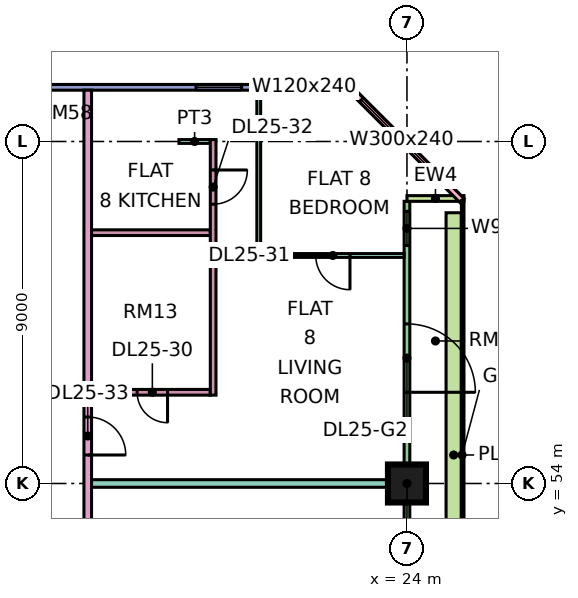
"""IFC4 building model, lengths in metres.
Left out: names, types, materials, properties, quantities, classifications, styles, units other than length and angle.
Written with IfcOpenShell. Run it as: python <this file> out.ifc"""

import sys

from ifc_helpers import new_model, si_unit, direction, frame, frame_2d, origin, origin_2d, place, context, subcontext, project, spatial, rectangle, extrude, element, fill, save


model = new_model("IFC4")
c1 = context("Model", 3, precision=1e-05, world=origin(), true_north=direction((0.0, 1.0)))
c2 = subcontext(c1, "Body", "Model", "MODEL_VIEW")
j1 = project(units=[si_unit("LENGTHUNIT", "METRE"), si_unit("PLANEANGLEUNIT", "RADIAN")], contexts=[c1])
p1 = place(None, origin())
s1 = spatial("IfcSite", under=j1, at=p1, CompositionType="ELEMENT")
p2 = place(p1, origin())
s2 = spatial("IfcBuilding", under=s1, at=p2, CompositionType="ELEMENT")
p3 = place(p2, frame((0.0, 0.0, 110.65)))
s3 = spatial("IfcBuildingStorey", under=s2, at=p3, CompositionType="ELEMENT", Elevation=110.65)
p4 = place(p3, frame((24.0, 54.0, 0.0), z_axis=(0.0, 0.0, 1.0), x_axis=(1.0, 0.0, 0.0)))
e1 = element("IfcColumn", 1, at=p4, inside=s3, PredefinedType="COLUMN", context=c2, shape_type="SweptSolid", body=[
    extrude(rectangle(XDim=1.0, YDim=1.0, at=origin_2d()), origin(), (0.0, 0.0, 1.0), 3.75),
])
p5 = place(p3, frame((24.0, 48.075, 0.0), z_axis=(0.0, 0.0, 1.0), x_axis=(0.0, 1.0, 0.0)))
e2 = element("IfcWall", 2, at=p5, inside=s3, PredefinedType="SOLIDWALL", context=c2, shape_type="SweptSolid", body=[
    extrude(rectangle(XDim=13.35, YDim=0.15, at=frame_2d((6.675, 0.0))), origin(), (0.0, 0.0, 1.0), 3.35),
])
p6 = place(p5, frame((0.562, 0.0, 0.45)))
e3 = element("IfcOpeningElement", 3, at=p6, cuts=e2, PredefinedType="OPENING", context=c2, shape_type="SweptSolid", body=[
    extrude(rectangle(XDim=4.2, YDim=2.4, at=frame_2d((2.1, 1.2))), frame((0.0, 0.085, 0.0), z_axis=(0.0, -1.0, 0.0), x_axis=(1.0, 0.0, 0.0)), (0.0, 0.0, 1.0), 0.17),
])
p7 = place(p5, frame((8.325, 0.0, 0.0)))
e4 = element("IfcOpeningElement", 4, at=p7, cuts=e2, PredefinedType="OPENING", context=c2, shape_type="SweptSolid", body=[
    extrude(rectangle(XDim=1.8, YDim=2.4, at=frame_2d((0.9, 1.2))), frame((0.0, 0.085, 0.0), z_axis=(0.0, -1.0, 0.0), x_axis=(1.0, 0.0, 0.0)), (0.0, 0.0, 1.0), 0.17),
])
p8 = place(p5, frame((12.188, 0.0, 0.45)))
e5 = element("IfcOpeningElement", 5, at=p8, cuts=e2, PredefinedType="OPENING", context=c2, shape_type="SweptSolid", body=[
    extrude(rectangle(XDim=0.9, YDim=2.4, at=frame_2d((0.45, 1.2))), frame((0.0, 0.085, 0.0), z_axis=(0.0, -1.0, 0.0), x_axis=(1.0, 0.0, 0.0)), (0.0, 0.0, 1.0), 0.17),
])
p9 = place(p3, frame((25.5, 61.5, 0.0), z_axis=(0.0, 0.0, 1.0), x_axis=(-1.0, 0.0, 0.0)))
e6 = element("IfcWall", 6, at=p9, inside=s3, PredefinedType="SOLIDWALL", context=c2, shape_type="SweptSolid", body=[
    extrude(rectangle(XDim=1.5, YDim=0.15, at=frame_2d((0.75, 0.0))), origin(), (0.0, 0.0, 1.0), 3.35),
])
p10 = place(p3, frame((25.447, 61.447, 0.0), z_axis=(0.0, 0.0, 1.0), x_axis=(-0.707106781187, 0.707106781187, 0.0)))
e7 = element("IfcWall", 7, at=p10, inside=s3, PredefinedType="SOLIDWALL", context=c2, shape_type="SweptSolid", body=[
    extrude(rectangle(XDim=4.243, YDim=0.15, at=frame_2d((2.121, 0.0))), origin(), (0.0, 0.0, 1.0), 3.35),
])
p11 = place(p10, frame((0.744, 0.0, 0.45)))
e8 = element("IfcOpeningElement", 8, at=p11, cuts=e7, PredefinedType="OPENING", context=c2, shape_type="SweptSolid", body=[
    extrude(rectangle(XDim=3.0, YDim=2.4, at=frame_2d((1.5, 1.2))), frame((0.0, 0.085, 0.0), z_axis=(0.0, -1.0, 0.0), x_axis=(1.0, 0.0, 0.0)), (0.0, 0.0, 1.0), 0.17),
])
p12 = place(p3, frame((22.5, 64.425, 0.0), z_axis=(0.0, 0.0, 1.0), x_axis=(-1.0, 0.0, 0.0)))
e9 = element("IfcWall", 9, at=p12, inside=s3, PredefinedType="SOLIDWALL", context=c2, shape_type="SweptSolid", body=[
    extrude(rectangle(XDim=10.425, YDim=0.15, at=frame_2d((5.212, 0.0))), origin(), (0.0, 0.0, 1.0), 3.35),
])
p13 = place(p12, frame((0.6, 0.0, 0.45)))
e10 = element("IfcOpeningElement", 10, at=p13, cuts=e9, PredefinedType="OPENING", context=c2, shape_type="SweptSolid", body=[
    extrude(rectangle(XDim=1.2, YDim=2.4, at=frame_2d((0.6, 1.2))), frame((0.0, 0.085, 0.0), z_axis=(0.0, -1.0, 0.0), x_axis=(1.0, 0.0, 0.0)), (0.0, 0.0, 1.0), 0.17),
])
p14 = place(p12, frame((2.85, 0.0, 0.45)))
e11 = element("IfcOpeningElement", 11, at=p14, cuts=e9, PredefinedType="OPENING", context=c2, shape_type="SweptSolid", body=[
    extrude(rectangle(XDim=1.2, YDim=2.4, at=frame_2d((0.6, 1.2))), frame((0.0, 0.085, 0.0), z_axis=(0.0, -1.0, 0.0), x_axis=(1.0, 0.0, 0.0)), (0.0, 0.0, 1.0), 0.17),
])
p15 = place(p3, frame((25.229, 48.375, 0.0), z_axis=(0.0, 0.0, 1.0), x_axis=(0.0, 1.0, 0.0)))
e12 = element("IfcWall", 12, at=p15, inside=s3, PredefinedType="SOLIDWALL", context=c2, shape_type="SweptSolid", body=[
    extrude(rectangle(XDim=12.75, YDim=0.4, at=frame_2d((6.375, 0.0))), origin(), (0.0, 0.0, 1.0), 0.7),
])
p16 = place(p3, frame((15.6, 51.225, 0.0), z_axis=(0.0, 0.0, 1.0), x_axis=(0.0, 1.0, 0.0)))
e13 = element("IfcWall", 13, at=p16, inside=s3, PredefinedType="PARTITIONING", context=c2, shape_type="SweptSolid", body=[
    extrude(rectangle(XDim=13.125, YDim=0.2, at=frame_2d((6.562, 0.0))), origin(), (0.0, 0.0, 1.0), 3.35),
])
p17 = place(p16, frame((3.525, 0.0, 0.0)))
e14 = element("IfcOpeningElement", 14, at=p17, cuts=e13, PredefinedType="OPENING", context=c2, shape_type="SweptSolid", body=[
    extrude(rectangle(XDim=1.0, YDim=2.1, at=frame_2d((0.5, 1.05))), frame((0.0, 0.11, 0.0), z_axis=(0.0, -1.0, 0.0), x_axis=(1.0, 0.0, 0.0)), (0.0, 0.0, 1.0), 0.22),
])
p18 = place(p3, frame((15.7, 54.0, 0.0), z_axis=(0.0, 0.0, 1.0), x_axis=(1.0, 0.0, 0.0)))
e15 = element("IfcWall", 15, at=p18, inside=s3, PredefinedType="PARTITIONING", context=c2, shape_type="SweptSolid", body=[
    extrude(rectangle(XDim=8.226, YDim=0.2, at=frame_2d((4.113, 0.0))), origin(), (0.0, 0.0, 1.0), 3.35),
])
p19 = place(p3, frame((15.7, 56.4, 0.0), z_axis=(0.0, 0.0, 1.0), x_axis=(1.0, 0.0, 0.0)))
e16 = element("IfcWall", 16, at=p19, inside=s3, PredefinedType="PARTITIONING", context=c2, shape_type="SweptSolid", body=[
    extrude(rectangle(XDim=3.125, YDim=0.15, at=frame_2d((1.562, 0.0))), origin(), (0.0, 0.0, 1.0), 3.35),
])
p20 = place(p19, frame((1.2, 0.0, 0.0)))
e17 = element("IfcOpeningElement", 17, at=p20, cuts=e16, PredefinedType="OPENING", context=c2, shape_type="SweptSolid", body=[
    extrude(rectangle(XDim=0.8, YDim=2.1, at=frame_2d((0.4, 1.05))), frame((0.0, 0.085, 0.0), z_axis=(0.0, -1.0, 0.0), x_axis=(1.0, 0.0, 0.0)), (0.0, 0.0, 1.0), 0.17),
])
p21 = place(p3, frame((15.7, 60.6, 0.0), z_axis=(0.0, 0.0, 1.0), x_axis=(1.0, 0.0, 0.0)))
e18 = element("IfcWall", 18, at=p21, inside=s3, PredefinedType="PARTITIONING", context=c2, shape_type="SweptSolid", body=[
    extrude(rectangle(XDim=3.125, YDim=0.15, at=frame_2d((1.562, 0.0))), origin(), (0.0, 0.0, 1.0), 3.35),
])
p22 = place(p3, frame((18.0, 63.0, 0.0), z_axis=(0.0, 0.0, 1.0), x_axis=(1.0, 0.0, 0.0)))
e19 = element("IfcWall", 19, at=p22, inside=s3, PredefinedType="PARTITIONING", context=c2, shape_type="SweptSolid", body=[
    extrude(rectangle(XDim=0.825, YDim=0.1, at=frame_2d((0.413, 0.0))), origin(), (0.0, 0.0, 1.0), 3.35),
])
p23 = place(p3, frame((18.9, 56.325, 0.0), z_axis=(0.0, 0.0, 1.0), x_axis=(0.0, 1.0, 0.0)))
e20 = element("IfcWall", 20, at=p23, inside=s3, PredefinedType="PARTITIONING", context=c2, shape_type="SweptSolid", body=[
    extrude(rectangle(XDim=6.725, YDim=0.15, at=frame_2d((3.363, 0.0))), origin(), (0.0, 0.0, 1.0), 3.35),
])
p24 = place(p23, frame((5.025, 0.0, 0.0)))
e21 = element("IfcOpeningElement", 21, at=p24, cuts=e20, PredefinedType="OPENING", context=c2, shape_type="SweptSolid", body=[
    extrude(rectangle(XDim=0.9, YDim=2.1, at=frame_2d((0.45, 1.05))), frame((0.0, 0.085, 0.0), z_axis=(0.0, -1.0, 0.0), x_axis=(1.0, 0.0, 0.0)), (0.0, 0.0, 1.0), 0.17),
])
p25 = place(p3, frame((20.1, 59.95, 0.0), z_axis=(0.0, 0.0, 1.0), x_axis=(0.0, 1.0, 0.0)))
e22 = element("IfcWall", 22, at=p25, inside=s3, PredefinedType="PARTITIONING", context=c2, shape_type="SweptSolid", body=[
    extrude(rectangle(XDim=4.401, YDim=0.1, at=frame_2d((2.201, 0.0))), origin(), (0.0, 0.0, 1.0), 3.35),
])
p26 = place(p3, frame((20.15, 60.0, 0.0), z_axis=(0.0, 0.0, 1.0), x_axis=(1.0, 0.0, 0.0)))
e23 = element("IfcWall", 23, at=p26, inside=s3, PredefinedType="PARTITIONING", context=c2, shape_type="SweptSolid", body=[
    extrude(rectangle(XDim=3.776, YDim=0.1, at=frame_2d((1.888, 0.0))), origin(), (0.0, 0.0, 1.0), 3.35),
])
p27 = place(p26, frame((1.45, 0.0, 0.0)))
e24 = element("IfcOpeningElement", 24, at=p27, cuts=e23, PredefinedType="OPENING", context=c2, shape_type="SweptSolid", body=[
    extrude(rectangle(XDim=0.9, YDim=2.1, at=frame_2d((0.45, 1.05))), frame((0.0, 0.06, 0.0), z_axis=(0.0, -1.0, 0.0), x_axis=(1.0, 0.0, 0.0)), (0.0, 0.0, 1.0), 0.12),
])
p28 = place(p7, frame((1.8, 0.0, 0.0), z_axis=(0.0, 0.0, 1.0), x_axis=(-1.0, 0.0, 0.0)))
e25 = element("IfcDoor", 25, at=p28, inside=s3, OperationType="DOUBLE_DOOR_SINGLE_SWING", PredefinedType="DOOR", context=c2, shape_type="SweptSolid", body=[
    extrude(rectangle(XDim=1.8, YDim=2.4, at=frame_2d((0.9, 1.2))), frame((0.0, 0.025, 0.0), z_axis=(0.0, -1.0, 0.0), x_axis=(1.0, 0.0, 0.0)), (0.0, 0.0, 1.0), 0.05),
])
fill(e4, e25)
p29 = place(p8, origin())
e26 = element("IfcWindow", 26, at=p29, inside=s3, PartitioningType="SINGLE_PANEL", PredefinedType="WINDOW", context=c2, shape_type="SweptSolid", body=[
    extrude(rectangle(XDim=0.9, YDim=2.4, at=frame_2d((0.45, 1.2))), frame((0.0, 0.03, 0.0), z_axis=(0.0, -1.0, 0.0), x_axis=(1.0, 0.0, 0.0)), (0.0, 0.0, 1.0), 0.06),
])
fill(e5, e26)
p30 = place(p11, origin())
e27 = element("IfcWindow", 27, at=p30, inside=s3, PartitioningType="SINGLE_PANEL", PredefinedType="WINDOW", context=c2, shape_type="SweptSolid", body=[
    extrude(rectangle(XDim=3.0, YDim=2.4, at=frame_2d((1.5, 1.2))), frame((0.0, 0.03, 0.0), z_axis=(0.0, -1.0, 0.0), x_axis=(1.0, 0.0, 0.0)), (0.0, 0.0, 1.0), 0.06),
])
fill(e8, e27)
p31 = place(p13, origin())
e28 = element("IfcWindow", 28, at=p31, inside=s3, PartitioningType="SINGLE_PANEL", PredefinedType="WINDOW", context=c2, shape_type="SweptSolid", body=[
    extrude(rectangle(XDim=1.2, YDim=2.4, at=frame_2d((0.6, 1.2))), frame((0.0, 0.03, 0.0), z_axis=(0.0, -1.0, 0.0), x_axis=(1.0, 0.0, 0.0)), (0.0, 0.0, 1.0), 0.06),
])
fill(e10, e28)
p32 = place(p14, origin())
e29 = element("IfcWindow", 29, at=p32, inside=s3, PartitioningType="SINGLE_PANEL", PredefinedType="WINDOW", context=c2, shape_type="SweptSolid", body=[
    extrude(rectangle(XDim=1.2, YDim=2.4, at=frame_2d((0.6, 1.2))), frame((0.0, 0.03, 0.0), z_axis=(0.0, -1.0, 0.0), x_axis=(1.0, 0.0, 0.0)), (0.0, 0.0, 1.0), 0.06),
])
fill(e11, e29)
p33 = place(p20, origin())
e30 = element("IfcDoor", 30, at=p33, inside=s3, OperationType="SINGLE_SWING_RIGHT", PredefinedType="DOOR", context=c2, shape_type="SweptSolid", body=[
    extrude(rectangle(XDim=0.8, YDim=2.1, at=frame_2d((0.4, 1.05))), frame((0.0, 0.025, 0.0), z_axis=(0.0, -1.0, 0.0), x_axis=(1.0, 0.0, 0.0)), (0.0, 0.0, 1.0), 0.05),
])
fill(e17, e30)
p34 = place(p27, origin())
e31 = element("IfcDoor", 31, at=p34, inside=s3, OperationType="SINGLE_SWING_RIGHT", PredefinedType="DOOR", context=c2, shape_type="SweptSolid", body=[
    extrude(rectangle(XDim=0.9, YDim=2.1, at=frame_2d((0.45, 1.05))), frame((0.0, 0.025, 0.0), z_axis=(0.0, -1.0, 0.0), x_axis=(1.0, 0.0, 0.0)), (0.0, 0.0, 1.0), 0.05),
])
fill(e24, e31)
p35 = place(p24, origin())
e32 = element("IfcDoor", 32, at=p35, inside=s3, OperationType="SINGLE_SWING_RIGHT", PredefinedType="DOOR", context=c2, shape_type="SweptSolid", body=[
    extrude(rectangle(XDim=0.9, YDim=2.1, at=frame_2d((0.45, 1.05))), frame((0.0, 0.025, 0.0), z_axis=(0.0, -1.0, 0.0), x_axis=(1.0, 0.0, 0.0)), (0.0, 0.0, 1.0), 0.05),
])
fill(e21, e32)
p36 = place(p17, frame((1.0, 0.0, 0.0), z_axis=(0.0, 0.0, 1.0), x_axis=(-1.0, 0.0, 0.0)))
e33 = element("IfcDoor", 33, at=p36, inside=s3, OperationType="SINGLE_SWING_LEFT", PredefinedType="DOOR", context=c2, shape_type="SweptSolid", body=[
    extrude(rectangle(XDim=1.0, YDim=2.1, at=frame_2d((0.5, 1.05))), frame((0.0, 0.025, 0.0), z_axis=(0.0, -1.0, 0.0), x_axis=(1.0, 0.0, 0.0)), (0.0, 0.0, 1.0), 0.05),
])
fill(e14, e33)
save(model, sys.argv[1])
